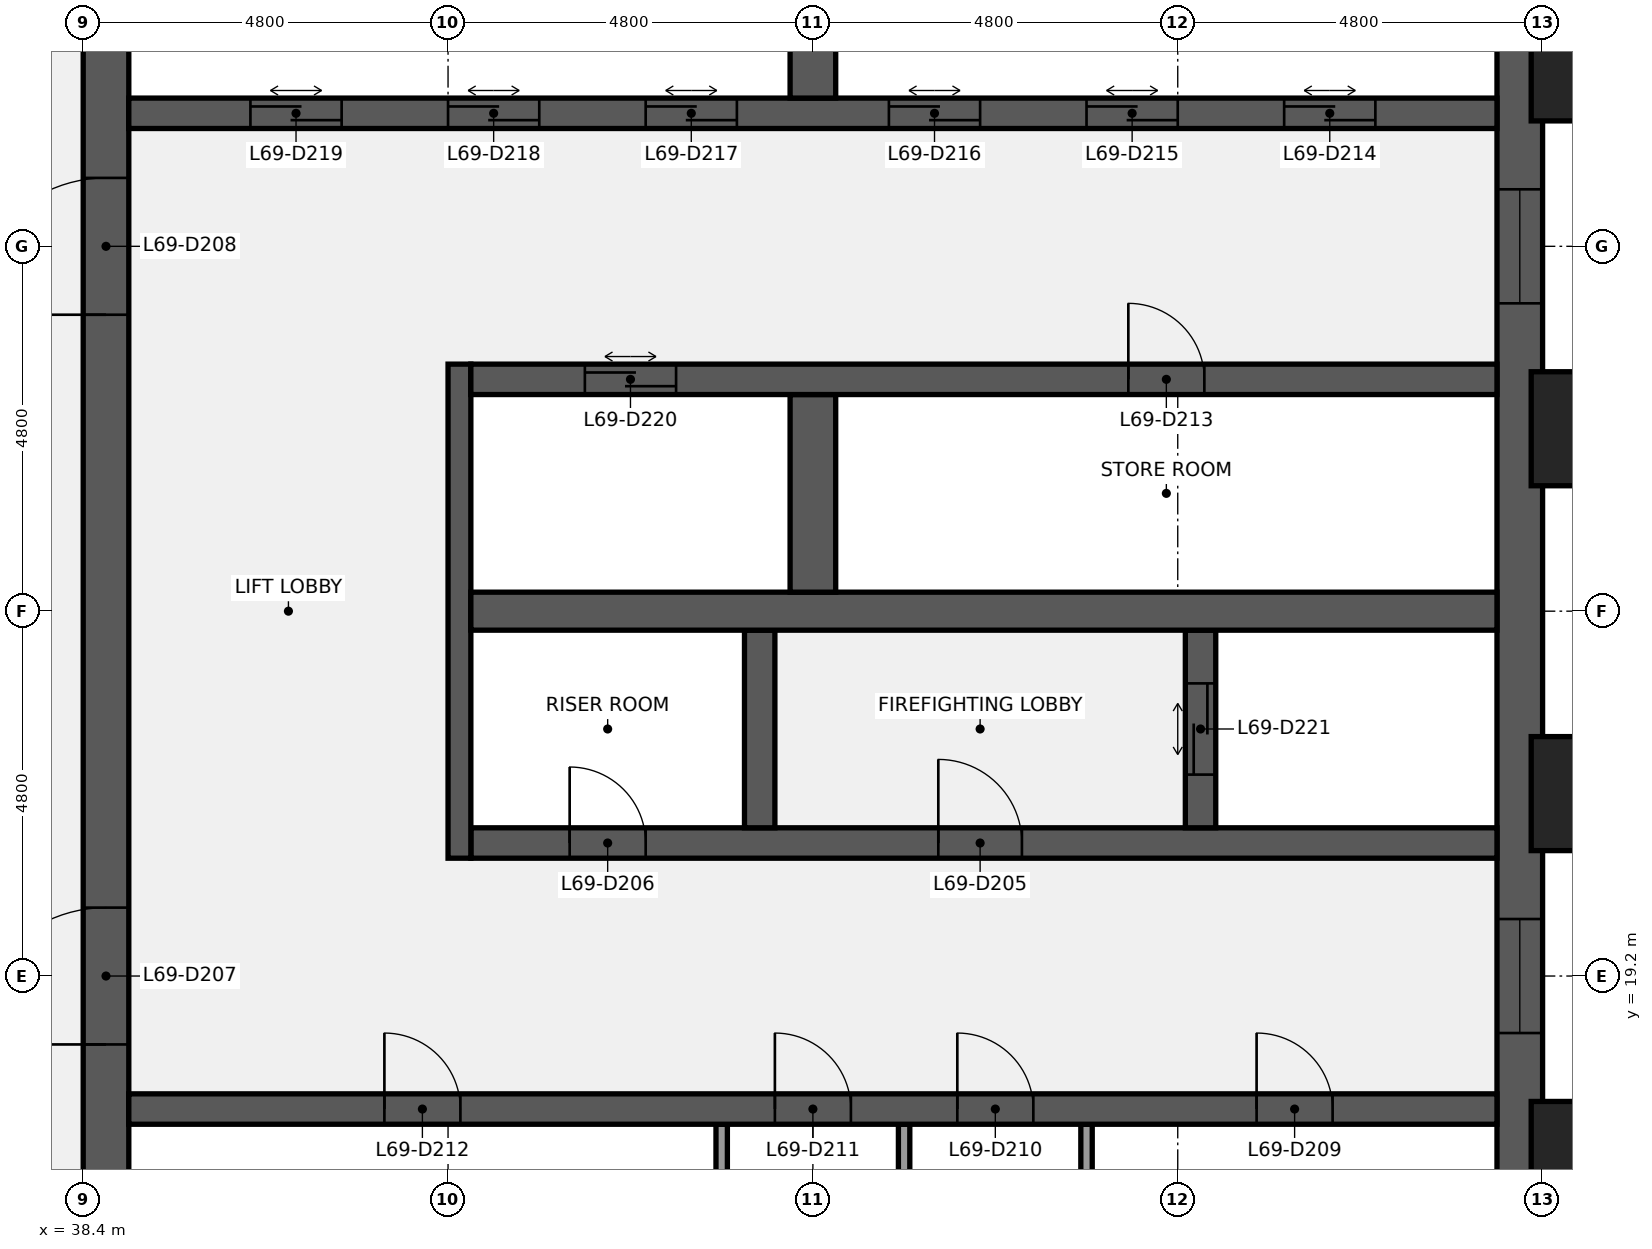
"""IFC4 building model, lengths in metres.
Left out: names, types, materials, properties, quantities, classifications, styles, units other than length and angle.
Written with IfcOpenShell. Run it as: python <this file> out.ifc"""

import sys

from ifc_helpers import new_model, si_unit, direction, frame, frame_2d, origin, origin_2d, place, context, subcontext, project, spatial, rectangle, extrude, element, fill, save


model = new_model("IFC4")
c1 = context("Model", 3, precision=1e-05, world=origin(), true_north=direction((0.0, 1.0)))
c2 = subcontext(c1, "Body", "Model", "MODEL_VIEW")
j1 = project(units=[si_unit("LENGTHUNIT", "METRE"), si_unit("PLANEANGLEUNIT", "RADIAN")], contexts=[c1])
p1 = place(None, origin())
s1 = spatial("IfcSite", under=j1, at=p1, CompositionType="ELEMENT")
p2 = place(p1, origin())
s2 = spatial("IfcBuilding", under=s1, at=p2, CompositionType="ELEMENT")
p3 = place(p2, frame((0.0, 0.0, 314.3)))
s3 = spatial("IfcBuildingStorey", under=s2, at=p3, CompositionType="ELEMENT", Elevation=314.3)
p4 = place(p3, frame((57.3, 38.4, 0.0), z_axis=(0.0, 0.0, 1.0), x_axis=(0.0, -1.0, 0.0)))
e1 = element("IfcWall", 1, at=p4, inside=s3, PredefinedType="SHEAR", context=c2, shape_type="SweptSolid", body=[
    extrude(rectangle(XDim=28.8, YDim=0.6, at=frame_2d((14.4, 0.0))), origin(), (0.0, 0.0, 1.0), 3.84),
])
p5 = place(p4, frame((18.45, 0.0, 0.9)))
e2 = element("IfcOpeningElement", 2, at=p5, cuts=e1, PredefinedType="OPENING", context=c2, shape_type="SweptSolid", body=[
    extrude(rectangle(XDim=1.5, YDim=1.5, at=frame_2d((0.75, 0.75))), frame((0.0, 0.31, 0.0), z_axis=(0.0, -1.0, 0.0), x_axis=(1.0, 0.0, 0.0)), (0.0, 0.0, 1.0), 0.62),
])
p6 = place(p4, frame((8.85, 0.0, 0.9)))
e3 = element("IfcOpeningElement", 3, at=p6, cuts=e1, PredefinedType="OPENING", context=c2, shape_type="SweptSolid", body=[
    extrude(rectangle(XDim=1.5, YDim=1.5, at=frame_2d((0.75, 0.75))), frame((0.0, 0.31, 0.0), z_axis=(0.0, -1.0, 0.0), x_axis=(1.0, 0.0, 0.0)), (0.0, 0.0, 1.0), 0.62),
])
p7 = place(p3, frame((38.7, 9.6, 0.0), z_axis=(0.0, 0.0, 1.0), x_axis=(0.0, 1.0, 0.0)))
e4 = element("IfcWall", 4, at=p7, inside=s3, PredefinedType="SHEAR", context=c2, shape_type="SweptSolid", body=[
    extrude(rectangle(XDim=28.8, YDim=0.6, at=frame_2d((14.4, 0.0))), origin(), (0.0, 0.0, 1.0), 3.84),
])
p8 = place(p7, frame((8.7, 0.0, 0.0)))
e5 = element("IfcOpeningElement", 5, at=p8, cuts=e4, PredefinedType="OPENING", context=c2, shape_type="SweptSolid", body=[
    extrude(rectangle(XDim=1.8, YDim=2.1, at=frame_2d((0.9, 1.05))), frame((0.0, 0.31, 0.0), z_axis=(0.0, -1.0, 0.0), x_axis=(1.0, 0.0, 0.0)), (0.0, 0.0, 1.0), 0.62),
])
p9 = place(p7, frame((18.3, 0.0, 0.0)))
e6 = element("IfcOpeningElement", 6, at=p9, cuts=e4, PredefinedType="OPENING", context=c2, shape_type="SweptSolid", body=[
    extrude(rectangle(XDim=1.8, YDim=2.1, at=frame_2d((0.9, 1.05))), frame((0.0, 0.31, 0.0), z_axis=(0.0, -1.0, 0.0), x_axis=(1.0, 0.0, 0.0)), (0.0, 0.0, 1.0), 0.62),
])
for number, where, z_axis, x_axis in (
    (7, (51.6, 14.65, 0.0), (0.0, 0.0, 1.0), (0.0, 1.0, 0.0)),
    (8, (49.2, 14.65, 0.0), (0.0, 0.0, 1.0), (0.0, 1.0, 0.0)),
    (9, (46.8, 14.65, 0.0), (0.0, 0.0, 1.0), (0.0, 1.0, 0.0)),
):
    element("IfcWall", number, at=place(p3, frame(where, z_axis=z_axis, x_axis=x_axis)), inside=s3, PredefinedType="PARTITIONING", context=c2, shape_type="SweptSolid", body=[
        extrude(rectangle(XDim=2.6, YDim=0.15, at=frame_2d((1.3, 0.0))), origin(), (0.0, 0.0, 1.0), 3.84),
    ])
p10 = place(p3, frame((39.0, 17.45, 0.0), z_axis=(0.0, 0.0, 1.0), x_axis=(1.0, 0.0, 0.0)))
e10 = element("IfcWall", 10, at=p10, inside=s3, PredefinedType="SHEAR", context=c2, shape_type="SweptSolid", body=[
    extrude(rectangle(XDim=18.0, YDim=0.4, at=frame_2d((9.0, 0.0))), origin(), (0.0, 0.0, 1.0), 3.84),
])
p11 = place(p10, frame((14.837, 0.0, 0.0)))
e11 = element("IfcOpeningElement", 11, at=p11, cuts=e10, PredefinedType="OPENING", context=c2, shape_type="SweptSolid", body=[
    extrude(rectangle(XDim=1.0, YDim=2.1, at=frame_2d((0.5, 1.05))), frame((0.0, 0.21, 0.0), z_axis=(0.0, -1.0, 0.0), x_axis=(1.0, 0.0, 0.0)), (0.0, 0.0, 1.0), 0.42),
])
p12 = place(p10, frame((10.9, 0.0, 0.0)))
e12 = element("IfcOpeningElement", 12, at=p12, cuts=e10, PredefinedType="OPENING", context=c2, shape_type="SweptSolid", body=[
    extrude(rectangle(XDim=1.0, YDim=2.1, at=frame_2d((0.5, 1.05))), frame((0.0, 0.21, 0.0), z_axis=(0.0, -1.0, 0.0), x_axis=(1.0, 0.0, 0.0)), (0.0, 0.0, 1.0), 0.42),
])
p13 = place(p10, frame((8.5, 0.0, 0.0)))
e13 = element("IfcOpeningElement", 13, at=p13, cuts=e10, PredefinedType="OPENING", context=c2, shape_type="SweptSolid", body=[
    extrude(rectangle(XDim=1.0, YDim=2.1, at=frame_2d((0.5, 1.05))), frame((0.0, 0.21, 0.0), z_axis=(0.0, -1.0, 0.0), x_axis=(1.0, 0.0, 0.0)), (0.0, 0.0, 1.0), 0.42),
])
p14 = place(p10, frame((3.363, 0.0, 0.0)))
e14 = element("IfcOpeningElement", 14, at=p14, cuts=e10, PredefinedType="OPENING", context=c2, shape_type="SweptSolid", body=[
    extrude(rectangle(XDim=1.0, YDim=2.1, at=frame_2d((0.5, 1.05))), frame((0.0, 0.21, 0.0), z_axis=(0.0, -1.0, 0.0), x_axis=(1.0, 0.0, 0.0)), (0.0, 0.0, 1.0), 0.42),
])
p15 = place(p3, frame((43.5, 20.95, 0.0), z_axis=(0.0, 0.0, 1.0), x_axis=(1.0, 0.0, 0.0)))
e15 = element("IfcWall", 15, at=p15, inside=s3, PredefinedType="SHEAR", context=c2, shape_type="SweptSolid", body=[
    extrude(rectangle(XDim=13.5, YDim=0.4, at=frame_2d((6.75, 0.0))), origin(), (0.0, 0.0, 1.0), 3.84),
])
p16 = place(p15, frame((6.15, 0.0, 0.0)))
e16 = element("IfcOpeningElement", 16, at=p16, cuts=e15, PredefinedType="OPENING", context=c2, shape_type="SweptSolid", body=[
    extrude(rectangle(XDim=1.1, YDim=2.1, at=frame_2d((0.55, 1.05))), frame((0.0, 0.21, 0.0), z_axis=(0.0, -1.0, 0.0), x_axis=(1.0, 0.0, 0.0)), (0.0, 0.0, 1.0), 0.42),
])
p17 = place(p15, frame((1.3, 0.0, 0.0)))
e17 = element("IfcOpeningElement", 17, at=p17, cuts=e15, PredefinedType="OPENING", context=c2, shape_type="SweptSolid", body=[
    extrude(rectangle(XDim=1.0, YDim=2.1, at=frame_2d((0.5, 1.05))), frame((0.0, 0.21, 0.0), z_axis=(0.0, -1.0, 0.0), x_axis=(1.0, 0.0, 0.0)), (0.0, 0.0, 1.0), 0.42),
])
p18 = place(p3, frame((43.35, 20.75, 0.0), z_axis=(0.0, 0.0, 1.0), x_axis=(0.0, 1.0, 0.0)))
e18 = element("IfcWall", 18, at=p18, inside=s3, PredefinedType="SHEAR", context=c2, shape_type="SweptSolid", body=[
    extrude(rectangle(XDim=6.5, YDim=0.3, at=frame_2d((3.25, 0.0))), origin(), (0.0, 0.0, 1.0), 3.84),
])
p19 = place(p3, frame((53.1, 21.15, 0.0), z_axis=(0.0, 0.0, 1.0), x_axis=(0.0, 1.0, 0.0)))
e19 = element("IfcWall", 19, at=p19, inside=s3, PredefinedType="SHEAR", context=c2, shape_type="SweptSolid", body=[
    extrude(rectangle(XDim=2.6, YDim=0.4, at=frame_2d((1.3, 0.0))), origin(), (0.0, 0.0, 1.0), 3.84),
])
p20 = place(p19, frame((0.7, 0.0, 0.0)))
e20 = element("IfcOpeningElement", 20, at=p20, cuts=e19, PredefinedType="OPENING", context=c2, shape_type="SweptSolid", body=[
    extrude(rectangle(XDim=1.2, YDim=2.1, at=frame_2d((0.6, 1.05))), frame((0.0, 0.21, 0.0), z_axis=(0.0, -1.0, 0.0), x_axis=(1.0, 0.0, 0.0)), (0.0, 0.0, 1.0), 0.42),
])
p21 = place(p3, frame((47.3, 21.15, 0.0), z_axis=(0.0, 0.0, 1.0), x_axis=(0.0, 1.0, 0.0)))
e21 = element("IfcWall", 21, at=p21, inside=s3, PredefinedType="SHEAR", context=c2, shape_type="SweptSolid", body=[
    extrude(rectangle(XDim=2.6, YDim=0.4, at=frame_2d((1.3, 0.0))), origin(), (0.0, 0.0, 1.0), 3.84),
])
p22 = place(p3, frame((43.5, 24.0, 0.0), z_axis=(0.0, 0.0, 1.0), x_axis=(1.0, 0.0, 0.0)))
e22 = element("IfcWall", 22, at=p22, inside=s3, PredefinedType="SHEAR", context=c2, shape_type="SweptSolid", body=[
    extrude(rectangle(XDim=13.5, YDim=0.5, at=frame_2d((6.75, 0.0))), origin(), (0.0, 0.0, 1.0), 3.84),
])
p23 = place(p3, frame((48.0, 24.25, 0.0), z_axis=(0.0, 0.0, 1.0), x_axis=(0.0, 1.0, 0.0)))
e23 = element("IfcWall", 23, at=p23, inside=s3, PredefinedType="SHEAR", context=c2, shape_type="SweptSolid", body=[
    extrude(rectangle(XDim=2.6, YDim=0.6, at=frame_2d((1.3, 0.0))), origin(), (0.0, 0.0, 1.0), 3.84),
])
p24 = place(p3, frame((43.5, 27.05, 0.0), z_axis=(0.0, 0.0, 1.0), x_axis=(1.0, 0.0, 0.0)))
e24 = element("IfcWall", 24, at=p24, inside=s3, PredefinedType="SHEAR", context=c2, shape_type="SweptSolid", body=[
    extrude(rectangle(XDim=13.5, YDim=0.4, at=frame_2d((6.75, 0.0))), origin(), (0.0, 0.0, 1.0), 3.84),
])
p25 = place(p24, frame((8.65, 0.0, 0.0)))
e25 = element("IfcOpeningElement", 25, at=p25, cuts=e24, PredefinedType="OPENING", context=c2, shape_type="SweptSolid", body=[
    extrude(rectangle(XDim=1.0, YDim=2.1, at=frame_2d((0.5, 1.05))), frame((0.0, 0.21, 0.0), z_axis=(0.0, -1.0, 0.0), x_axis=(1.0, 0.0, 0.0)), (0.0, 0.0, 1.0), 0.42),
])
p26 = place(p24, frame((1.5, 0.0, 0.0)))
e26 = element("IfcOpeningElement", 26, at=p26, cuts=e24, PredefinedType="OPENING", context=c2, shape_type="SweptSolid", body=[
    extrude(rectangle(XDim=1.2, YDim=2.1, at=frame_2d((0.6, 1.05))), frame((0.0, 0.21, 0.0), z_axis=(0.0, -1.0, 0.0), x_axis=(1.0, 0.0, 0.0)), (0.0, 0.0, 1.0), 0.42),
])
p27 = place(p3, frame((39.0, 30.55, 0.0), z_axis=(0.0, 0.0, 1.0), x_axis=(1.0, 0.0, 0.0)))
e27 = element("IfcWall", 27, at=p27, inside=s3, PredefinedType="SHEAR", context=c2, shape_type="SweptSolid", body=[
    extrude(rectangle(XDim=18.0, YDim=0.4, at=frame_2d((9.0, 0.0))), origin(), (0.0, 0.0, 1.0), 3.84),
])
p28 = place(p27, frame((15.2, 0.0, 0.0)))
e28 = element("IfcOpeningElement", 28, at=p28, cuts=e27, PredefinedType="OPENING", context=c2, shape_type="SweptSolid", body=[
    extrude(rectangle(XDim=1.2, YDim=2.1, at=frame_2d((0.6, 1.05))), frame((0.0, 0.21, 0.0), z_axis=(0.0, -1.0, 0.0), x_axis=(1.0, 0.0, 0.0)), (0.0, 0.0, 1.0), 0.42),
])
p29 = place(p27, frame((12.6, 0.0, 0.0)))
e29 = element("IfcOpeningElement", 29, at=p29, cuts=e27, PredefinedType="OPENING", context=c2, shape_type="SweptSolid", body=[
    extrude(rectangle(XDim=1.2, YDim=2.1, at=frame_2d((0.6, 1.05))), frame((0.0, 0.21, 0.0), z_axis=(0.0, -1.0, 0.0), x_axis=(1.0, 0.0, 0.0)), (0.0, 0.0, 1.0), 0.42),
])
p30 = place(p27, frame((10.0, 0.0, 0.0)))
e30 = element("IfcOpeningElement", 30, at=p30, cuts=e27, PredefinedType="OPENING", context=c2, shape_type="SweptSolid", body=[
    extrude(rectangle(XDim=1.2, YDim=2.1, at=frame_2d((0.6, 1.05))), frame((0.0, 0.21, 0.0), z_axis=(0.0, -1.0, 0.0), x_axis=(1.0, 0.0, 0.0)), (0.0, 0.0, 1.0), 0.42),
])
p31 = place(p27, frame((6.8, 0.0, 0.0)))
e31 = element("IfcOpeningElement", 31, at=p31, cuts=e27, PredefinedType="OPENING", context=c2, shape_type="SweptSolid", body=[
    extrude(rectangle(XDim=1.2, YDim=2.1, at=frame_2d((0.6, 1.05))), frame((0.0, 0.21, 0.0), z_axis=(0.0, -1.0, 0.0), x_axis=(1.0, 0.0, 0.0)), (0.0, 0.0, 1.0), 0.42),
])
p32 = place(p27, frame((4.2, 0.0, 0.0)))
e32 = element("IfcOpeningElement", 32, at=p32, cuts=e27, PredefinedType="OPENING", context=c2, shape_type="SweptSolid", body=[
    extrude(rectangle(XDim=1.2, YDim=2.1, at=frame_2d((0.6, 1.05))), frame((0.0, 0.21, 0.0), z_axis=(0.0, -1.0, 0.0), x_axis=(1.0, 0.0, 0.0)), (0.0, 0.0, 1.0), 0.42),
])
p33 = place(p27, frame((1.6, 0.0, 0.0)))
e33 = element("IfcOpeningElement", 33, at=p33, cuts=e27, PredefinedType="OPENING", context=c2, shape_type="SweptSolid", body=[
    extrude(rectangle(XDim=1.2, YDim=2.1, at=frame_2d((0.6, 1.05))), frame((0.0, 0.21, 0.0), z_axis=(0.0, -1.0, 0.0), x_axis=(1.0, 0.0, 0.0)), (0.0, 0.0, 1.0), 0.42),
])
p34 = place(p3, frame((48.0, 30.75, 0.0), z_axis=(0.0, 0.0, 1.0), x_axis=(0.0, 1.0, 0.0)))
e34 = element("IfcWall", 34, at=p34, inside=s3, PredefinedType="SHEAR", context=c2, shape_type="SweptSolid", body=[
    extrude(rectangle(XDim=2.6, YDim=0.6, at=frame_2d((1.3, 0.0))), origin(), (0.0, 0.0, 1.0), 3.84),
])
for number, where, z_axis, x_axis in (
    (35, (58.35, 16.8, 0.0), (0.0, 0.0, 1.0), (0.0, 1.0, 0.0)),
    (36, (58.35, 21.6, 0.0), (0.0, 0.0, 1.0), (0.0, 1.0, 0.0)),
    (37, (58.35, 26.4, 0.0), (0.0, 0.0, 1.0), (0.0, 1.0, 0.0)),
    (38, (58.35, 31.2, 0.0), (0.0, 0.0, 1.0), (0.0, 1.0, 0.0)),
):
    element("IfcColumn", number, at=place(p3, frame(where, z_axis=z_axis, x_axis=x_axis)), inside=s3, PredefinedType="PILASTER", context=c2, shape_type="SweptSolid", body=[
        extrude(rectangle(XDim=1.8, YDim=1.5, at=origin_2d()), origin(), (0.0, 0.0, 1.0), 4.0),
    ])
p35 = place(p16, origin())
e39 = element("IfcDoor", 39, at=p35, inside=s3, OperationType="SINGLE_SWING_LEFT", PredefinedType="DOOR", context=c2, shape_type="SweptSolid", body=[
    extrude(rectangle(XDim=1.1, YDim=2.1, at=frame_2d((0.55, 1.05))), frame((0.0, 0.025, 0.0), z_axis=(0.0, -1.0, 0.0), x_axis=(1.0, 0.0, 0.0)), (0.0, 0.0, 1.0), 0.05),
])
fill(e16, e39)
p36 = place(p17, origin())
e40 = element("IfcDoor", 40, at=p36, inside=s3, OperationType="SINGLE_SWING_LEFT", PredefinedType="DOOR", context=c2, shape_type="SweptSolid", body=[
    extrude(rectangle(XDim=1.0, YDim=2.1, at=frame_2d((0.5, 1.05))), frame((0.0, 0.025, 0.0), z_axis=(0.0, -1.0, 0.0), x_axis=(1.0, 0.0, 0.0)), (0.0, 0.0, 1.0), 0.05),
])
fill(e17, e40)
p37 = place(p8, origin())
e41 = element("IfcDoor", 41, at=p37, inside=s3, OperationType="DOUBLE_DOOR_SINGLE_SWING", PredefinedType="DOOR", context=c2, shape_type="SweptSolid", body=[
    extrude(rectangle(XDim=1.8, YDim=2.1, at=frame_2d((0.9, 1.05))), frame((0.0, 0.025, 0.0), z_axis=(0.0, -1.0, 0.0), x_axis=(1.0, 0.0, 0.0)), (0.0, 0.0, 1.0), 0.05),
])
fill(e5, e41)
p38 = place(p9, origin())
e42 = element("IfcDoor", 42, at=p38, inside=s3, OperationType="DOUBLE_DOOR_SINGLE_SWING", PredefinedType="DOOR", context=c2, shape_type="SweptSolid", body=[
    extrude(rectangle(XDim=1.8, YDim=2.1, at=frame_2d((0.9, 1.05))), frame((0.0, 0.025, 0.0), z_axis=(0.0, -1.0, 0.0), x_axis=(1.0, 0.0, 0.0)), (0.0, 0.0, 1.0), 0.05),
])
fill(e6, e42)
p39 = place(p11, origin())
e43 = element("IfcDoor", 43, at=p39, inside=s3, OperationType="SINGLE_SWING_LEFT", PredefinedType="DOOR", context=c2, shape_type="SweptSolid", body=[
    extrude(rectangle(XDim=1.0, YDim=2.1, at=frame_2d((0.5, 1.05))), frame((0.0, 0.025, 0.0), z_axis=(0.0, -1.0, 0.0), x_axis=(1.0, 0.0, 0.0)), (0.0, 0.0, 1.0), 0.05),
])
fill(e11, e43)
p40 = place(p12, origin())
e44 = element("IfcDoor", 44, at=p40, inside=s3, OperationType="SINGLE_SWING_LEFT", PredefinedType="DOOR", context=c2, shape_type="SweptSolid", body=[
    extrude(rectangle(XDim=1.0, YDim=2.1, at=frame_2d((0.5, 1.05))), frame((0.0, 0.025, 0.0), z_axis=(0.0, -1.0, 0.0), x_axis=(1.0, 0.0, 0.0)), (0.0, 0.0, 1.0), 0.05),
])
fill(e12, e44)
p41 = place(p13, origin())
e45 = element("IfcDoor", 45, at=p41, inside=s3, OperationType="SINGLE_SWING_LEFT", PredefinedType="DOOR", context=c2, shape_type="SweptSolid", body=[
    extrude(rectangle(XDim=1.0, YDim=2.1, at=frame_2d((0.5, 1.05))), frame((0.0, 0.025, 0.0), z_axis=(0.0, -1.0, 0.0), x_axis=(1.0, 0.0, 0.0)), (0.0, 0.0, 1.0), 0.05),
])
fill(e13, e45)
p42 = place(p14, origin())
e46 = element("IfcDoor", 46, at=p42, inside=s3, OperationType="SINGLE_SWING_LEFT", PredefinedType="DOOR", context=c2, shape_type="SweptSolid", body=[
    extrude(rectangle(XDim=1.0, YDim=2.1, at=frame_2d((0.5, 1.05))), frame((0.0, 0.025, 0.0), z_axis=(0.0, -1.0, 0.0), x_axis=(1.0, 0.0, 0.0)), (0.0, 0.0, 1.0), 0.05),
])
fill(e14, e46)
p43 = place(p25, origin())
e47 = element("IfcDoor", 47, at=p43, inside=s3, OperationType="SINGLE_SWING_LEFT", PredefinedType="DOOR", context=c2, shape_type="SweptSolid", body=[
    extrude(rectangle(XDim=1.0, YDim=2.1, at=frame_2d((0.5, 1.05))), frame((0.0, 0.025, 0.0), z_axis=(0.0, -1.0, 0.0), x_axis=(1.0, 0.0, 0.0)), (0.0, 0.0, 1.0), 0.05),
])
fill(e25, e47)
p44 = place(p28, origin())
e48 = element("IfcDoor", 48, at=p44, inside=s3, OperationType="DOUBLE_DOOR_SLIDING", PredefinedType="DOOR", context=c2, shape_type="SweptSolid", body=[
    extrude(rectangle(XDim=1.2, YDim=2.1, at=frame_2d((0.6, 1.05))), frame((0.0, 0.025, 0.0), z_axis=(0.0, -1.0, 0.0), x_axis=(1.0, 0.0, 0.0)), (0.0, 0.0, 1.0), 0.05),
])
fill(e28, e48)
p45 = place(p29, origin())
e49 = element("IfcDoor", 49, at=p45, inside=s3, OperationType="DOUBLE_DOOR_SLIDING", PredefinedType="DOOR", context=c2, shape_type="SweptSolid", body=[
    extrude(rectangle(XDim=1.2, YDim=2.1, at=frame_2d((0.6, 1.05))), frame((0.0, 0.025, 0.0), z_axis=(0.0, -1.0, 0.0), x_axis=(1.0, 0.0, 0.0)), (0.0, 0.0, 1.0), 0.05),
])
fill(e29, e49)
p46 = place(p30, origin())
e50 = element("IfcDoor", 50, at=p46, inside=s3, OperationType="DOUBLE_DOOR_SLIDING", PredefinedType="DOOR", context=c2, shape_type="SweptSolid", body=[
    extrude(rectangle(XDim=1.2, YDim=2.1, at=frame_2d((0.6, 1.05))), frame((0.0, 0.025, 0.0), z_axis=(0.0, -1.0, 0.0), x_axis=(1.0, 0.0, 0.0)), (0.0, 0.0, 1.0), 0.05),
])
fill(e30, e50)
p47 = place(p31, origin())
e51 = element("IfcDoor", 51, at=p47, inside=s3, OperationType="DOUBLE_DOOR_SLIDING", PredefinedType="DOOR", context=c2, shape_type="SweptSolid", body=[
    extrude(rectangle(XDim=1.2, YDim=2.1, at=frame_2d((0.6, 1.05))), frame((0.0, 0.025, 0.0), z_axis=(0.0, -1.0, 0.0), x_axis=(1.0, 0.0, 0.0)), (0.0, 0.0, 1.0), 0.05),
])
fill(e31, e51)
p48 = place(p32, origin())
e52 = element("IfcDoor", 52, at=p48, inside=s3, OperationType="DOUBLE_DOOR_SLIDING", PredefinedType="DOOR", context=c2, shape_type="SweptSolid", body=[
    extrude(rectangle(XDim=1.2, YDim=2.1, at=frame_2d((0.6, 1.05))), frame((0.0, 0.025, 0.0), z_axis=(0.0, -1.0, 0.0), x_axis=(1.0, 0.0, 0.0)), (0.0, 0.0, 1.0), 0.05),
])
fill(e32, e52)
p49 = place(p33, origin())
e53 = element("IfcDoor", 53, at=p49, inside=s3, OperationType="DOUBLE_DOOR_SLIDING", PredefinedType="DOOR", context=c2, shape_type="SweptSolid", body=[
    extrude(rectangle(XDim=1.2, YDim=2.1, at=frame_2d((0.6, 1.05))), frame((0.0, 0.025, 0.0), z_axis=(0.0, -1.0, 0.0), x_axis=(1.0, 0.0, 0.0)), (0.0, 0.0, 1.0), 0.05),
])
fill(e33, e53)
p50 = place(p26, origin())
e54 = element("IfcDoor", 54, at=p50, inside=s3, OperationType="DOUBLE_DOOR_SLIDING", PredefinedType="DOOR", context=c2, shape_type="SweptSolid", body=[
    extrude(rectangle(XDim=1.2, YDim=2.1, at=frame_2d((0.6, 1.05))), frame((0.0, 0.025, 0.0), z_axis=(0.0, -1.0, 0.0), x_axis=(1.0, 0.0, 0.0)), (0.0, 0.0, 1.0), 0.05),
])
fill(e26, e54)
p51 = place(p20, origin())
e55 = element("IfcDoor", 55, at=p51, inside=s3, OperationType="DOUBLE_DOOR_SLIDING", PredefinedType="DOOR", context=c2, shape_type="SweptSolid", body=[
    extrude(rectangle(XDim=1.2, YDim=2.1, at=frame_2d((0.6, 1.05))), frame((0.0, 0.025, 0.0), z_axis=(0.0, -1.0, 0.0), x_axis=(1.0, 0.0, 0.0)), (0.0, 0.0, 1.0), 0.05),
])
fill(e20, e55)
p52 = place(p5, origin())
e56 = element("IfcWindow", 56, at=p52, inside=s3, PartitioningType="SINGLE_PANEL", PredefinedType="WINDOW", context=c2, shape_type="SweptSolid", body=[
    extrude(rectangle(XDim=1.5, YDim=1.5, at=frame_2d((0.75, 0.75))), frame((0.0, 0.03, 0.0), z_axis=(0.0, -1.0, 0.0), x_axis=(1.0, 0.0, 0.0)), (0.0, 0.0, 1.0), 0.06),
])
fill(e2, e56)
p53 = place(p6, origin())
e57 = element("IfcWindow", 57, at=p53, inside=s3, PartitioningType="SINGLE_PANEL", PredefinedType="WINDOW", context=c2, shape_type="SweptSolid", body=[
    extrude(rectangle(XDim=1.5, YDim=1.5, at=frame_2d((0.75, 0.75))), frame((0.0, 0.03, 0.0), z_axis=(0.0, -1.0, 0.0), x_axis=(1.0, 0.0, 0.0)), (0.0, 0.0, 1.0), 0.06),
])
fill(e3, e57)
save(model, sys.argv[1])
